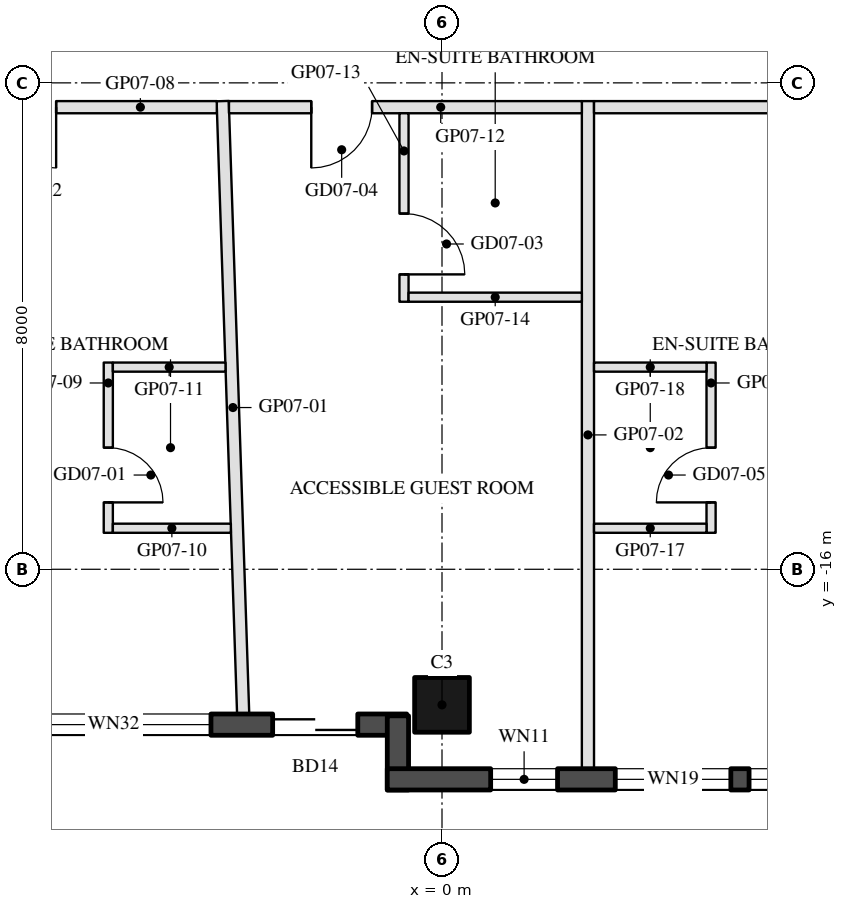
"""IFC4 building model, lengths in metres.
Left out: names, types, materials, properties, quantities, classifications, styles, units other than length and angle.
Written with IfcOpenShell. Run it as: python <this file> out.ifc"""

import sys

from ifc_helpers import new_model, si_unit, direction, frame, frame_2d, origin, origin_2d, place, context, subcontext, project, spatial, rectangle, hollow_rectangle, extrude, element, fill, save


model = new_model("IFC4")
c1 = context("Model", 3, precision=1e-05, world=origin(), true_north=direction((0.0, 1.0)))
c2 = subcontext(c1, "Body", "Model", "MODEL_VIEW")
j1 = project(units=[si_unit("LENGTHUNIT", "METRE"), si_unit("PLANEANGLEUNIT", "RADIAN")], contexts=[c1])
p1 = place(None, origin())
s1 = spatial("IfcSite", under=j1, at=p1, CompositionType="ELEMENT")
p2 = place(p1, origin())
s2 = spatial("IfcBuilding", under=s1, at=p2, CompositionType="ELEMENT")
p3 = place(p2, frame((0.0, 0.0, 98.3)))
s3 = spatial("IfcBuildingStorey", under=s2, at=p3, CompositionType="ELEMENT", Elevation=98.3)
p4 = place(p3, frame((0.0, -18.23, 0.0), z_axis=(0.0, 0.0, 1.0), x_axis=(-1.0, 0.0, 0.0)))
e1 = element("IfcColumn", 1, at=p4, inside=s3, PredefinedType="COLUMN", context=c2, shape_type="SweptSolid", body=[
    extrude(hollow_rectangle(XDim=0.9, YDim=0.9, WallThickness=0.04, at=origin_2d()), origin(), (0.0, 0.0, 1.0), 3.7),
])
p5 = place(p3, frame((-7.32, -18.555, 0.0), z_axis=(0.0, 0.0, 1.0), x_axis=(1.0, 0.0, 0.0)))
e2 = element("IfcWall", 2, at=p5, inside=s3, PredefinedType="SOLIDWALL", context=c2, shape_type="SweptSolid", body=[
    extrude(rectangle(XDim=6.74, YDim=0.35, at=frame_2d((3.37, 0.0))), origin(), (0.0, 0.0, 1.0), 3.55),
])
p6 = place(p5, frame((0.32, 0.0, 0.3)))
e3 = element("IfcOpeningElement", 3, at=p6, cuts=e2, PredefinedType="OPENING", context=c2, shape_type="SweptSolid", body=[
    extrude(rectangle(XDim=3.2, YDim=2.65, at=frame_2d((1.6, 1.325))), frame((0.0, 0.185, 0.0), z_axis=(0.0, -1.0, 0.0), x_axis=(1.0, 0.0, 0.0)), (0.0, 0.0, 1.0), 0.37),
])
p7 = place(p5, frame((4.535, 0.0, 0.0)))
e4 = element("IfcOpeningElement", 4, at=p7, cuts=e2, PredefinedType="OPENING", context=c2, shape_type="SweptSolid", body=[
    extrude(rectangle(XDim=1.4, YDim=2.4, at=frame_2d((0.7, 1.2))), frame((0.0, 0.185, 0.0), z_axis=(0.0, -1.0, 0.0), x_axis=(1.0, 0.0, 0.0)), (0.0, 0.0, 1.0), 0.37),
])
p8 = place(p3, frame((-0.725, -18.41, 0.0), z_axis=(0.0, 0.0, 1.0), x_axis=(0.0, -1.0, 0.0)))
e5 = element("IfcWall", 5, at=p8, inside=s3, PredefinedType="SOLIDWALL", context=c2, shape_type="SweptSolid", body=[
    extrude(rectangle(XDim=1.22, YDim=0.35, at=frame_2d((0.61, 0.0))), origin(), (0.0, 0.0, 1.0), 3.55),
])
p9 = place(p3, frame((-0.9, -19.455, 0.0), z_axis=(0.0, 0.0, 1.0), x_axis=(1.0, 0.0, 0.0)))
e6 = element("IfcWall", 6, at=p9, inside=s3, PredefinedType="SOLIDWALL", context=c2, shape_type="SweptSolid", body=[
    extrude(rectangle(XDim=9.7, YDim=0.35, at=frame_2d((4.85, 0.0))), origin(), (0.0, 0.0, 1.0), 3.55),
])
p10 = place(p9, frame((1.7, 0.0, 0.3)))
e7 = element("IfcOpeningElement", 7, at=p10, cuts=e6, PredefinedType="OPENING", context=c2, shape_type="SweptSolid", body=[
    extrude(rectangle(XDim=1.1, YDim=2.65, at=frame_2d((0.55, 1.325))), frame((0.0, 0.185, 0.0), z_axis=(0.0, -1.0, 0.0), x_axis=(1.0, 0.0, 0.0)), (0.0, 0.0, 1.0), 0.37),
])
p11 = place(p9, frame((3.75, 0.0, 0.3)))
e8 = element("IfcOpeningElement", 8, at=p11, cuts=e6, PredefinedType="OPENING", context=c2, shape_type="SweptSolid", body=[
    extrude(rectangle(XDim=1.9, YDim=2.65, at=frame_2d((0.95, 1.325))), frame((0.0, 0.185, 0.0), z_axis=(0.0, -1.0, 0.0), x_axis=(1.0, 0.0, 0.0)), (0.0, 0.0, 1.0), 0.37),
])
p12 = place(p9, frame((5.95, 0.0, 0.3)))
e9 = element("IfcOpeningElement", 9, at=p12, cuts=e6, PredefinedType="OPENING", context=c2, shape_type="SweptSolid", body=[
    extrude(rectangle(XDim=1.9, YDim=2.65, at=frame_2d((0.95, 1.325))), frame((0.0, 0.185, 0.0), z_axis=(0.0, -1.0, 0.0), x_axis=(1.0, 0.0, 0.0)), (0.0, 0.0, 1.0), 0.37),
])
p13 = place(p3, frame((-3.27, -18.38, 0.0), z_axis=(0.0, 0.0, 1.0), x_axis=(-0.03338172908, 0.999442674776, 0.0)))
e10 = element("IfcWall", 10, at=p13, inside=s3, PredefinedType="PARTITIONING", context=c2, shape_type="SweptSolid", body=[
    extrude(rectangle(XDim=10.085, YDim=0.2, at=frame_2d((5.043, 0.0))), origin(), (0.0, 0.0, 1.0), 2.96),
])
p14 = place(p3, frame((2.4, -19.28, 0.0), z_axis=(0.0, 0.0, 1.0), x_axis=(0.0, 1.0, 0.0)))
e11 = element("IfcWall", 11, at=p14, inside=s3, PredefinedType="PARTITIONING", context=c2, shape_type="SweptSolid", body=[
    extrude(rectangle(XDim=10.98, YDim=0.2, at=frame_2d((5.49, 0.0))), origin(), (0.0, 0.0, 1.0), 2.96),
])
p15 = place(p3, frame((-3.703, -8.4, 0.0), z_axis=(0.0, 0.0, 1.0), x_axis=(-1.0, 0.0, 0.0)))
e12 = element("IfcWall", 12, at=p15, inside=s3, PredefinedType="PARTITIONING", context=c2, shape_type="SweptSolid", body=[
    extrude(rectangle(XDim=6.285, YDim=0.2, at=frame_2d((3.143, 0.0))), origin(), (0.0, 0.0, 1.0), 2.95),
])
p16 = place(p15, frame((2.642, 0.0, 0.0)))
e13 = element("IfcOpeningElement", 13, at=p16, cuts=e12, PredefinedType="OPENING", context=c2, shape_type="SweptSolid", body=[
    extrude(rectangle(XDim=1.0, YDim=2.1, at=frame_2d((0.5, 1.05))), frame((0.0, 0.11, 0.0), z_axis=(0.0, -1.0, 0.0), x_axis=(1.0, 0.0, 0.0)), (0.0, 0.0, 1.0), 0.22),
])
p17 = place(p3, frame((-5.488, -12.6, 0.0), z_axis=(0.0, 0.0, 1.0), x_axis=(0.0, -1.0, 0.0)))
e14 = element("IfcWall", 14, at=p17, inside=s3, PredefinedType="PARTITIONING", context=c2, shape_type="SweptSolid", body=[
    extrude(rectangle(XDim=2.8, YDim=0.15, at=frame_2d((1.4, 0.0))), origin(), (0.0, 0.0, 1.0), 3.55),
])
p18 = place(p17, frame((1.4, 0.0, 0.0)))
e15 = element("IfcOpeningElement", 15, at=p18, cuts=e14, PredefinedType="OPENING", context=c2, shape_type="SweptSolid", body=[
    extrude(rectangle(XDim=0.9, YDim=2.1, at=frame_2d((0.45, 1.05))), frame((0.0, 0.085, 0.0), z_axis=(0.0, -1.0, 0.0), x_axis=(1.0, 0.0, 0.0)), (0.0, 0.0, 1.0), 0.17),
])
p19 = place(p3, frame((-5.413, -15.325, 0.0), z_axis=(0.0, 0.0, 1.0), x_axis=(1.0, 0.0, 0.0)))
e16 = element("IfcWall", 16, at=p19, inside=s3, PredefinedType="PARTITIONING", context=c2, shape_type="SweptSolid", body=[
    extrude(rectangle(XDim=1.941, YDim=0.15, at=frame_2d((0.97, 0.0))), origin(), (0.0, 0.0, 1.0), 2.95),
])
p20 = place(p3, frame((-5.413, -12.675, 0.0), z_axis=(0.0, 0.0, 1.0), x_axis=(1.0, 0.0, 0.0)))
e17 = element("IfcWall", 17, at=p20, inside=s3, PredefinedType="PARTITIONING", context=c2, shape_type="SweptSolid", body=[
    extrude(rectangle(XDim=1.853, YDim=0.15, at=frame_2d((0.926, 0.0))), origin(), (0.0, 0.0, 1.0), 2.95),
])
p21 = place(p3, frame((2.3, -8.4, 0.0), z_axis=(0.0, 0.0, 1.0), x_axis=(-1.0, 0.0, 0.0)))
e18 = element("IfcWall", 18, at=p21, inside=s3, PredefinedType="PARTITIONING", context=c2, shape_type="SweptSolid", body=[
    extrude(rectangle(XDim=5.803, YDim=0.2, at=frame_2d((2.902, 0.0))), origin(), (0.0, 0.0, 1.0), 2.95),
])
p22 = place(p21, frame((3.45, 0.0, 0.0)))
e19 = element("IfcOpeningElement", 19, at=p22, cuts=e18, PredefinedType="OPENING", context=c2, shape_type="SweptSolid", body=[
    extrude(rectangle(XDim=1.0, YDim=2.1, at=frame_2d((0.5, 1.05))), frame((0.0, 0.11, 0.0), z_axis=(0.0, -1.0, 0.0), x_axis=(1.0, 0.0, 0.0)), (0.0, 0.0, 1.0), 0.22),
])
p23 = place(p3, frame((-0.625, -8.5, 0.0), z_axis=(0.0, 0.0, 1.0), x_axis=(0.0, -1.0, 0.0)))
e20 = element("IfcWall", 20, at=p23, inside=s3, PredefinedType="PARTITIONING", context=c2, shape_type="SweptSolid", body=[
    extrude(rectangle(XDim=3.1, YDim=0.15, at=frame_2d((1.55, 0.0))), origin(), (0.0, 0.0, 1.0), 3.55),
])
p24 = place(p23, frame((1.65, 0.0, 0.0)))
e21 = element("IfcOpeningElement", 21, at=p24, cuts=e20, PredefinedType="OPENING", context=c2, shape_type="SweptSolid", body=[
    extrude(rectangle(XDim=1.0, YDim=2.1, at=frame_2d((0.5, 1.05))), frame((0.0, 0.085, 0.0), z_axis=(0.0, -1.0, 0.0), x_axis=(1.0, 0.0, 0.0)), (0.0, 0.0, 1.0), 0.17),
])
p25 = place(p3, frame((-0.55, -11.525, 0.0), z_axis=(0.0, 0.0, 1.0), x_axis=(1.0, 0.0, 0.0)))
e22 = element("IfcWall", 22, at=p25, inside=s3, PredefinedType="PARTITIONING", context=c2, shape_type="SweptSolid", body=[
    extrude(rectangle(XDim=2.85, YDim=0.15, at=frame_2d((1.425, 0.0))), origin(), (0.0, 0.0, 1.0), 2.95),
])
p26 = place(p3, frame((9.988, -8.4, 0.0), z_axis=(0.0, 0.0, 1.0), x_axis=(-1.0, 0.0, 0.0)))
e23 = element("IfcWall", 23, at=p26, inside=s3, PredefinedType="PARTITIONING", context=c2, shape_type="SweptSolid", body=[
    extrude(rectangle(XDim=7.488, YDim=0.2, at=frame_2d((3.744, 0.0))), origin(), (0.0, 0.0, 1.0), 2.95),
])
p27 = place(p26, frame((3.244, 0.0, 0.0)))
e24 = element("IfcOpeningElement", 24, at=p27, cuts=e23, PredefinedType="OPENING", context=c2, shape_type="SweptSolid", body=[
    extrude(rectangle(XDim=1.0, YDim=2.1, at=frame_2d((0.5, 1.05))), frame((0.0, 0.11, 0.0), z_axis=(0.0, -1.0, 0.0), x_axis=(1.0, 0.0, 0.0)), (0.0, 0.0, 1.0), 0.22),
])
p28 = place(p3, frame((4.425, -15.4, 0.0), z_axis=(0.0, 0.0, 1.0), x_axis=(0.0, 1.0, 0.0)))
e25 = element("IfcWall", 25, at=p28, inside=s3, PredefinedType="PARTITIONING", context=c2, shape_type="SweptSolid", body=[
    extrude(rectangle(XDim=2.8, YDim=0.15, at=frame_2d((1.4, 0.0))), origin(), (0.0, 0.0, 1.0), 3.55),
])
p29 = place(p28, frame((0.5, 0.0, 0.0)))
e26 = element("IfcOpeningElement", 26, at=p29, cuts=e25, PredefinedType="OPENING", context=c2, shape_type="SweptSolid", body=[
    extrude(rectangle(XDim=0.9, YDim=2.1, at=frame_2d((0.45, 1.05))), frame((0.0, 0.085, 0.0), z_axis=(0.0, -1.0, 0.0), x_axis=(1.0, 0.0, 0.0)), (0.0, 0.0, 1.0), 0.17),
])
for number, where, z_axis, x_axis in (
    (27, (2.5, -15.325, 0.0), (0.0, 0.0, 1.0), (1.0, 0.0, 0.0)),
    (28, (2.5, -12.675, 0.0), (0.0, 0.0, 1.0), (1.0, 0.0, 0.0)),
):
    element("IfcWall", number, at=place(p3, frame(where, z_axis=z_axis, x_axis=x_axis)), inside=s3, PredefinedType="PARTITIONING", context=c2, shape_type="SweptSolid", body=[
        extrude(rectangle(XDim=1.85, YDim=0.15, at=frame_2d((0.925, 0.0))), origin(), (0.0, 0.0, 1.0), 2.95),
    ])
p30 = place(p6, origin())
e29 = element("IfcWindow", 29, at=p30, inside=s3, PartitioningType="SINGLE_PANEL", PredefinedType="WINDOW", context=c2, shape_type="SweptSolid", body=[
    extrude(rectangle(XDim=3.2, YDim=2.65, at=frame_2d((1.6, 1.325))), frame((0.0, 0.03, 0.0), z_axis=(0.0, -1.0, 0.0), x_axis=(1.0, 0.0, 0.0)), (0.0, 0.0, 1.0), 0.06),
])
fill(e3, e29)
p31 = place(p7, frame((1.4, 0.0, 0.0), z_axis=(0.0, 0.0, 1.0), x_axis=(-1.0, 0.0, 0.0)))
e30 = element("IfcDoor", 30, at=p31, inside=s3, OperationType="SLIDING_TO_LEFT", PredefinedType="DOOR", context=c2, shape_type="SweptSolid", body=[
    extrude(rectangle(XDim=1.4, YDim=2.4, at=frame_2d((0.7, 1.2))), frame((0.0, 0.025, 0.0), z_axis=(0.0, -1.0, 0.0), x_axis=(1.0, 0.0, 0.0)), (0.0, 0.0, 1.0), 0.05),
])
fill(e4, e30)
p32 = place(p10, origin())
e31 = element("IfcWindow", 31, at=p32, inside=s3, PartitioningType="SINGLE_PANEL", PredefinedType="WINDOW", context=c2, shape_type="SweptSolid", body=[
    extrude(rectangle(XDim=1.1, YDim=2.65, at=frame_2d((0.55, 1.325))), frame((0.0, 0.03, 0.0), z_axis=(0.0, -1.0, 0.0), x_axis=(1.0, 0.0, 0.0)), (0.0, 0.0, 1.0), 0.06),
])
fill(e7, e31)
p33 = place(p11, origin())
e32 = element("IfcWindow", 32, at=p33, inside=s3, PartitioningType="SINGLE_PANEL", PredefinedType="WINDOW", context=c2, shape_type="SweptSolid", body=[
    extrude(rectangle(XDim=1.9, YDim=2.65, at=frame_2d((0.95, 1.325))), frame((0.0, 0.03, 0.0), z_axis=(0.0, -1.0, 0.0), x_axis=(1.0, 0.0, 0.0)), (0.0, 0.0, 1.0), 0.06),
])
fill(e8, e32)
p34 = place(p12, origin())
e33 = element("IfcWindow", 33, at=p34, inside=s3, PartitioningType="SINGLE_PANEL", PredefinedType="WINDOW", context=c2, shape_type="SweptSolid", body=[
    extrude(rectangle(XDim=1.9, YDim=2.65, at=frame_2d((0.95, 1.325))), frame((0.0, 0.03, 0.0), z_axis=(0.0, -1.0, 0.0), x_axis=(1.0, 0.0, 0.0)), (0.0, 0.0, 1.0), 0.06),
])
fill(e9, e33)
p35 = place(p18, origin())
e34 = element("IfcDoor", 34, at=p35, inside=s3, OperationType="SINGLE_SWING_RIGHT", PredefinedType="DOOR", context=c2, shape_type="SweptSolid", body=[
    extrude(rectangle(XDim=0.9, YDim=2.1, at=frame_2d((0.45, 1.05))), frame((0.0, 0.025, 0.0), z_axis=(0.0, -1.0, 0.0), x_axis=(1.0, 0.0, 0.0)), (0.0, 0.0, 1.0), 0.05),
])
fill(e15, e34)
p36 = place(p16, origin())
e35 = element("IfcDoor", 35, at=p36, inside=s3, OperationType="SINGLE_SWING_LEFT", PredefinedType="DOOR", context=c2, shape_type="SweptSolid", body=[
    extrude(rectangle(XDim=1.0, YDim=2.1, at=frame_2d((0.5, 1.05))), frame((0.0, 0.025, 0.0), z_axis=(0.0, -1.0, 0.0), x_axis=(1.0, 0.0, 0.0)), (0.0, 0.0, 1.0), 0.05),
])
fill(e13, e35)
p37 = place(p24, origin())
e36 = element("IfcDoor", 36, at=p37, inside=s3, OperationType="SINGLE_SWING_RIGHT", PredefinedType="DOOR", context=c2, shape_type="SweptSolid", body=[
    extrude(rectangle(XDim=1.0, YDim=2.1, at=frame_2d((0.5, 1.05))), frame((0.0, 0.025, 0.0), z_axis=(0.0, -1.0, 0.0), x_axis=(1.0, 0.0, 0.0)), (0.0, 0.0, 1.0), 0.05),
])
fill(e21, e36)
p38 = place(p22, origin())
e37 = element("IfcDoor", 37, at=p38, inside=s3, OperationType="SINGLE_SWING_RIGHT", PredefinedType="DOOR", context=c2, shape_type="SweptSolid", body=[
    extrude(rectangle(XDim=1.0, YDim=2.1, at=frame_2d((0.5, 1.05))), frame((0.0, 0.025, 0.0), z_axis=(0.0, -1.0, 0.0), x_axis=(1.0, 0.0, 0.0)), (0.0, 0.0, 1.0), 0.05),
])
fill(e19, e37)
p39 = place(p29, origin())
e38 = element("IfcDoor", 38, at=p39, inside=s3, OperationType="SINGLE_SWING_LEFT", PredefinedType="DOOR", context=c2, shape_type="SweptSolid", body=[
    extrude(rectangle(XDim=0.9, YDim=2.1, at=frame_2d((0.45, 1.05))), frame((0.0, 0.025, 0.0), z_axis=(0.0, -1.0, 0.0), x_axis=(1.0, 0.0, 0.0)), (0.0, 0.0, 1.0), 0.05),
])
fill(e26, e38)
save(model, sys.argv[1])
